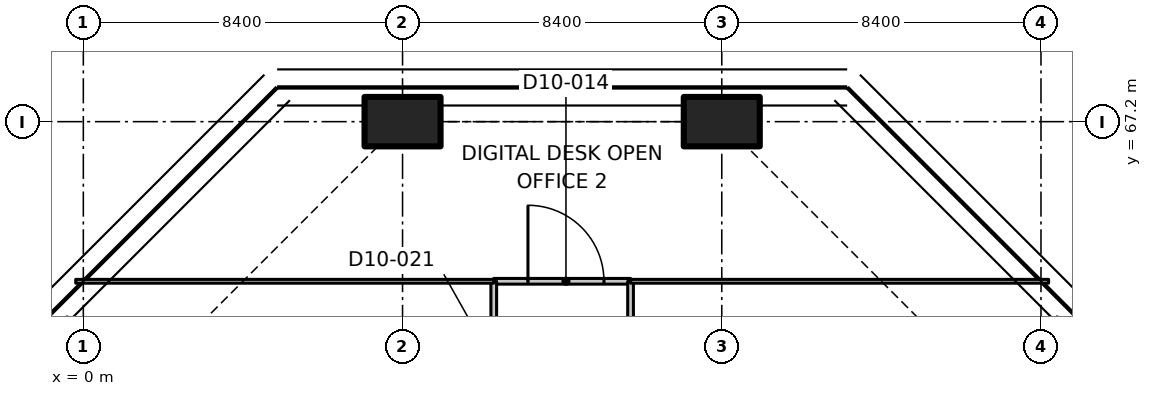
"""IFC4 building model, lengths in metres.
Left out: names, types, materials, properties, quantities, classifications, styles, units other than length and angle.
Written with IfcOpenShell. Run it as: python <this file> out.ifc"""

import sys

from ifc_helpers import new_model, si_unit, direction, frame, frame_2d, origin, origin_2d, place, context, subcontext, project, spatial, polyline, rectangle, outline, extrude, element, fill, save


model = new_model("IFC4")
c1 = context("Model", 3, precision=1e-05, world=origin(), true_north=direction((0.0, 1.0)))
c2 = subcontext(c1, "Body", "Model", "MODEL_VIEW")
j1 = project(units=[si_unit("LENGTHUNIT", "METRE"), si_unit("PLANEANGLEUNIT", "RADIAN")], contexts=[c1])
p1 = place(None, origin())
s1 = spatial("IfcSite", under=j1, at=p1, CompositionType="ELEMENT")
p2 = place(p1, origin())
s2 = spatial("IfcBuilding", under=s1, at=p2, CompositionType="ELEMENT")
p3 = place(p2, frame((0.0, 0.0, 72.5)))
s3 = spatial("IfcBuildingStorey", under=s2, at=p3, CompositionType="ELEMENT", Elevation=72.5)
for number, where, z_axis, x_axis in (
    (1, (8.4, 67.2, 0.0), (0.0, 0.0, 1.0), (0.0, 1.0, 0.0)),
    (2, (16.8, 67.2, 0.0), (0.0, 0.0, 1.0), (0.0, 1.0, 0.0)),
):
    element("IfcColumn", number, at=place(p3, frame(where, z_axis=z_axis, x_axis=x_axis)), inside=s3, PredefinedType="COLUMN", context=c2, shape_type="SweptSolid", body=[
        extrude(rectangle(XDim=1.3, YDim=2.0, at=origin_2d()), origin(), (0.0, 0.0, 1.0), 3.35),
    ])
p4 = place(p3, frame((10.8, 63.0, 0.0), z_axis=(0.0, 0.0, 1.0), x_axis=(1.0, 0.0, 0.0)))
e3 = element("IfcWall", 3, at=p4, inside=s3, PredefinedType="PARTITIONING", context=c2, shape_type="SweptSolid", body=[
    extrude(rectangle(XDim=3.6, YDim=0.15, at=frame_2d((1.8, 0.0))), origin(), (0.0, 0.0, 1.0), 3.33),
])
p5 = place(p4, frame((0.9, 0.0, 0.0)))
e4 = element("IfcOpeningElement", 4, at=p5, cuts=e3, PredefinedType="OPENING", context=c2, shape_type="SweptSolid", body=[
    extrude(rectangle(XDim=2.0, YDim=2.4, at=frame_2d((1.0, 1.2))), frame((0.0, 0.085, 0.0), z_axis=(0.0, -1.0, 0.0), x_axis=(1.0, 0.0, 0.0)), (0.0, 0.0, 1.0), 0.17),
])
p6 = place(p3, frame((10.8, 58.8, 0.0), z_axis=(0.0, 0.0, 1.0), x_axis=(0.0, 1.0, 0.0)))
e5 = element("IfcWall", 5, at=p6, inside=s3, PredefinedType="PARTITIONING", context=c2, shape_type="SweptSolid", body=[
    extrude(rectangle(XDim=4.2, YDim=0.15, at=frame_2d((2.1, 0.0))), origin(), (0.0, 0.0, 1.0), 3.33),
])
p7 = place(p6, frame((1.5, 0.0, 0.0)))
e6 = element("IfcOpeningElement", 6, at=p7, cuts=e5, PredefinedType="OPENING", context=c2, shape_type="SweptSolid", body=[
    extrude(rectangle(XDim=1.1, YDim=2.1, at=frame_2d((0.55, 1.05))), frame((0.0, 0.085, 0.0), z_axis=(0.0, -1.0, 0.0), x_axis=(1.0, 0.0, 0.0)), (0.0, 0.0, 1.0), 0.17),
])
p8 = place(p3, frame((14.4, 63.0, 0.0), z_axis=(0.0, 0.0, 1.0), x_axis=(0.0, -1.0, 0.0)))
e7 = element("IfcWall", 7, at=p8, inside=s3, PredefinedType="PARTITIONING", context=c2, shape_type="SweptSolid", body=[
    extrude(rectangle(XDim=4.2, YDim=0.15, at=frame_2d((2.1, 0.0))), origin(), (0.0, 0.0, 1.0), 3.33),
])
p9 = place(p8, frame((1.5, 0.0, 0.0)))
e8 = element("IfcOpeningElement", 8, at=p9, cuts=e7, PredefinedType="OPENING", context=c2, shape_type="SweptSolid", body=[
    extrude(rectangle(XDim=1.1, YDim=2.1, at=frame_2d((0.55, 1.05))), frame((0.0, 0.085, 0.0), z_axis=(0.0, -1.0, 0.0), x_axis=(1.0, 0.0, 0.0)), (0.0, 0.0, 1.0), 0.17),
])
p10 = place(p3, frame((10.8, 63.0, 0.0), z_axis=(0.0, 0.0, 1.0), x_axis=(-1.0, 0.0, 0.0)))
e9 = element("IfcWall", 9, at=p10, inside=s3, PredefinedType="PARTITIONING", context=c2, shape_type="SweptSolid", body=[
    extrude(outline(polyline([(0.0, 0.0), (11.0, 0.0), (11.0, 3.33), (7.266, 3.33), (7.264, 2.98), (5.936, 2.98), (5.934, 3.33), (0.0, 3.33), (0.0, 0.0)])), frame((0.0, 0.05, 0.0), z_axis=(0.0, -1.0, 0.0), x_axis=(1.0, 0.0, 0.0)), (0.0, 0.0, 1.0), 0.1),
])
p11 = place(p3, frame((25.4, 63.0, 0.0), z_axis=(0.0, 0.0, 1.0), x_axis=(-1.0, 0.0, 0.0)))
e10 = element("IfcWall", 10, at=p11, inside=s3, PredefinedType="PARTITIONING", context=c2, shape_type="SweptSolid", body=[
    extrude(outline(polyline([(0.0, 0.0), (11.0, 0.0), (11.0, 3.33), (5.066, 3.33), (5.064, 2.98), (3.736, 2.98), (3.734, 3.33), (0.0, 3.33), (0.0, 0.0)])), frame((0.0, 0.05, 0.0), z_axis=(0.0, -1.0, 0.0), x_axis=(1.0, 0.0, 0.0)), (0.0, 0.0, 1.0), 0.1),
])
p12 = place(p5, origin())
e11 = element("IfcDoor", 11, at=p12, inside=s3, OperationType="DOUBLE_DOOR_SINGLE_SWING", PredefinedType="DOOR", context=c2, shape_type="SweptSolid", body=[
    extrude(rectangle(XDim=2.0, YDim=2.4, at=frame_2d((1.0, 1.2))), frame((0.0, 0.025, 0.0), z_axis=(0.0, -1.0, 0.0), x_axis=(1.0, 0.0, 0.0)), (0.0, 0.0, 1.0), 0.05),
])
fill(e4, e11)
save(model, sys.argv[1])
